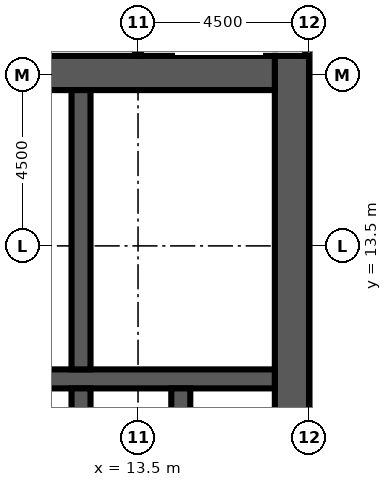
"""IFC4 building model, lengths in metres.
Left out: names, types, materials, properties, quantities, classifications, styles, units other than length and angle.
Written with IfcOpenShell. Run it as: python <this file> out.ifc"""

import sys

from ifc_helpers import new_model, si_unit, direction, frame, frame_2d, origin, place, context, subcontext, project, spatial, rectangle, extrude, element, fill, save


model = new_model("IFC4")
c1 = context("Model", 3, precision=1e-05, world=origin(), true_north=direction((0.0, 1.0)))
c2 = subcontext(c1, "Body", "Model", "MODEL_VIEW")
j1 = project(units=[si_unit("LENGTHUNIT", "METRE"), si_unit("PLANEANGLEUNIT", "RADIAN")], contexts=[c1])
p1 = place(None, origin())
s1 = spatial("IfcSite", under=j1, at=p1, CompositionType="ELEMENT")
p2 = place(p1, origin())
s2 = spatial("IfcBuilding", under=s1, at=p2, CompositionType="ELEMENT")
p3 = place(p2, frame((0.0, 0.0, 82.0)))
s3 = spatial("IfcBuildingStorey", under=s2, at=p3, CompositionType="ELEMENT", Elevation=82.0)
p4 = place(p3, frame((17.55, -9.0, 0.0), z_axis=(0.0, 0.0, 1.0), x_axis=(0.0, 1.0, 0.0)))
e1 = element("IfcWall", 1, at=p4, inside=s3, PredefinedType="SHEAR", context=c2, shape_type="SweptSolid", body=[
    extrude(rectangle(XDim=27.5, YDim=0.9, at=frame_2d((13.75, 0.0))), origin(), (0.0, 0.0, 1.0), 4.1),
])
p5 = place(p4, frame((12.55, 0.0, 0.0)))
e2 = element("IfcOpeningElement", 2, at=p5, cuts=e1, PredefinedType="OPENING", context=c2, shape_type="SweptSolid", body=[
    extrude(rectangle(XDim=2.4, YDim=2.4, at=frame_2d((1.2, 1.2))), frame((0.0, 0.46, 0.0), z_axis=(0.0, -1.0, 0.0), x_axis=(1.0, 0.0, 0.0)), (0.0, 0.0, 1.0), 0.92),
])
p6 = place(p4, frame((6.825, 0.0, 0.0)))
e3 = element("IfcOpeningElement", 3, at=p6, cuts=e1, PredefinedType="OPENING", context=c2, shape_type="SweptSolid", body=[
    extrude(rectangle(XDim=1.2, YDim=2.1, at=frame_2d((0.6, 1.05))), frame((0.0, 0.46, 0.0), z_axis=(0.0, -1.0, 0.0), x_axis=(1.0, 0.0, 0.0)), (0.0, 0.0, 1.0), 0.92),
])
p7 = place(p4, frame((19.475, 0.0, 0.0)))
e4 = element("IfcOpeningElement", 4, at=p7, cuts=e1, PredefinedType="OPENING", context=c2, shape_type="SweptSolid", body=[
    extrude(rectangle(XDim=1.2, YDim=2.1, at=frame_2d((0.6, 1.05))), frame((0.0, 0.46, 0.0), z_axis=(0.0, -1.0, 0.0), x_axis=(1.0, 0.0, 0.0)), (0.0, 0.0, 1.0), 0.92),
])
p8 = place(p3, frame((6.9, 18.05, 0.0), z_axis=(0.0, 0.0, 1.0), x_axis=(1.0, 0.0, 0.0)))
e5 = element("IfcWall", 5, at=p8, inside=s3, PredefinedType="SHEAR", context=c2, shape_type="SweptSolid", body=[
    extrude(rectangle(XDim=10.2, YDim=0.9, at=frame_2d((5.1, 0.0))), origin(), (0.0, 0.0, 1.0), 4.1),
])
p9 = place(p3, frame((6.9, 10.0, 0.0), z_axis=(0.0, 0.0, 1.0), x_axis=(1.0, 0.0, 0.0)))
e6 = element("IfcWall", 6, at=p9, inside=s3, PredefinedType="SHEAR", context=c2, shape_type="SweptSolid", body=[
    extrude(rectangle(XDim=10.2, YDim=0.5, at=frame_2d((5.1, 0.0))), origin(), (0.0, 0.0, 1.0), 4.1),
])
for number, where, z_axis, x_axis in (
    (7, (12.0, 6.95, 0.0), (0.0, 0.0, 1.0), (0.0, 1.0, 0.0)),
    (8, (14.625, 6.95, 0.0), (0.0, 0.0, 1.0), (0.0, 1.0, 0.0)),
):
    element("IfcWall", number, at=place(p3, frame(where, z_axis=z_axis, x_axis=x_axis)), inside=s3, PredefinedType="SHEAR", context=c2, shape_type="SweptSolid", body=[
        extrude(rectangle(XDim=2.8, YDim=0.5, at=frame_2d((1.4, 0.0))), origin(), (0.0, 0.0, 1.0), 4.1),
    ])
p10 = place(p3, frame((12.0, 10.25, 0.0), z_axis=(0.0, 0.0, 1.0), x_axis=(0.0, 1.0, 0.0)))
e9 = element("IfcWall", 9, at=p10, inside=s3, PredefinedType="SHEAR", context=c2, shape_type="SweptSolid", body=[
    extrude(rectangle(XDim=7.35, YDim=0.5, at=frame_2d((3.675, 0.0))), origin(), (0.0, 0.0, 1.0), 4.1),
])
for number, where, z_axis, x_axis in (
    (10, (6.9, 11.72, 0.0), (0.0, 0.0, 1.0), (1.0, 0.0, 0.0)),
    (11, (6.9, 13.558, 0.0), (0.0, 0.0, 1.0), (1.0, 0.0, 0.0)),
    (12, (6.9, 15.762, 0.0), (0.0, 0.0, 1.0), (1.0, 0.0, 0.0)),
):
    element("IfcWall", number, at=place(p3, frame(where, z_axis=z_axis, x_axis=x_axis)), inside=s3, PredefinedType="PARTITIONING", context=c2, shape_type="SweptSolid", body=[
        extrude(rectangle(XDim=4.85, YDim=0.1, at=frame_2d((2.425, 0.0))), origin(), (0.0, 0.0, 1.0), 3.65),
    ])
p11 = place(p3, frame((13.5, 26.4, 0.0), z_axis=(0.0, 0.0, 1.0), x_axis=(0.0, -1.0, 0.0)))
e13 = element("IfcWall", 13, at=p11, inside=s3, PredefinedType="PARTITIONING", context=c2, shape_type="SweptSolid", body=[
    extrude(rectangle(XDim=7.9, YDim=0.15, at=frame_2d((3.95, 0.0))), origin(), (0.0, 0.0, 1.0), 3.65),
])
p12 = place(p11, frame((2.55, 0.0, 0.0)))
e14 = element("IfcOpeningElement", 14, at=p12, cuts=e13, PredefinedType="OPENING", context=c2, shape_type="SweptSolid", body=[
    extrude(rectangle(XDim=1.0, YDim=2.1, at=frame_2d((0.5, 1.05))), frame((0.0, 0.085, 0.0), z_axis=(0.0, -1.0, 0.0), x_axis=(1.0, 0.0, 0.0)), (0.0, 0.0, 1.0), 0.17),
])
p13 = place(p3, frame((18.0, 18.5, 0.0), z_axis=(0.0, 0.0, 1.0), x_axis=(0.0, 1.0, 0.0)))
e15 = element("IfcWall", 15, at=p13, inside=s3, PredefinedType="PARTITIONING", context=c2, shape_type="SweptSolid", body=[
    extrude(rectangle(XDim=3.3, YDim=0.2, at=frame_2d((1.65, 0.0))), origin(), (0.0, 0.0, 1.0), 3.65),
])
p14 = place(p7, frame((1.2, 0.0, 0.0), z_axis=(0.0, 0.0, 1.0), x_axis=(-1.0, 0.0, 0.0)))
e16 = element("IfcDoor", 16, at=p14, inside=s3, OperationType="SINGLE_SWING_LEFT", PredefinedType="DOOR", context=c2, shape_type="SweptSolid", body=[
    extrude(rectangle(XDim=1.2, YDim=2.1, at=frame_2d((0.6, 1.05))), frame((0.0, 0.025, 0.0), z_axis=(0.0, -1.0, 0.0), x_axis=(1.0, 0.0, 0.0)), (0.0, 0.0, 1.0), 0.05),
])
fill(e4, e16)
save(model, sys.argv[1])
